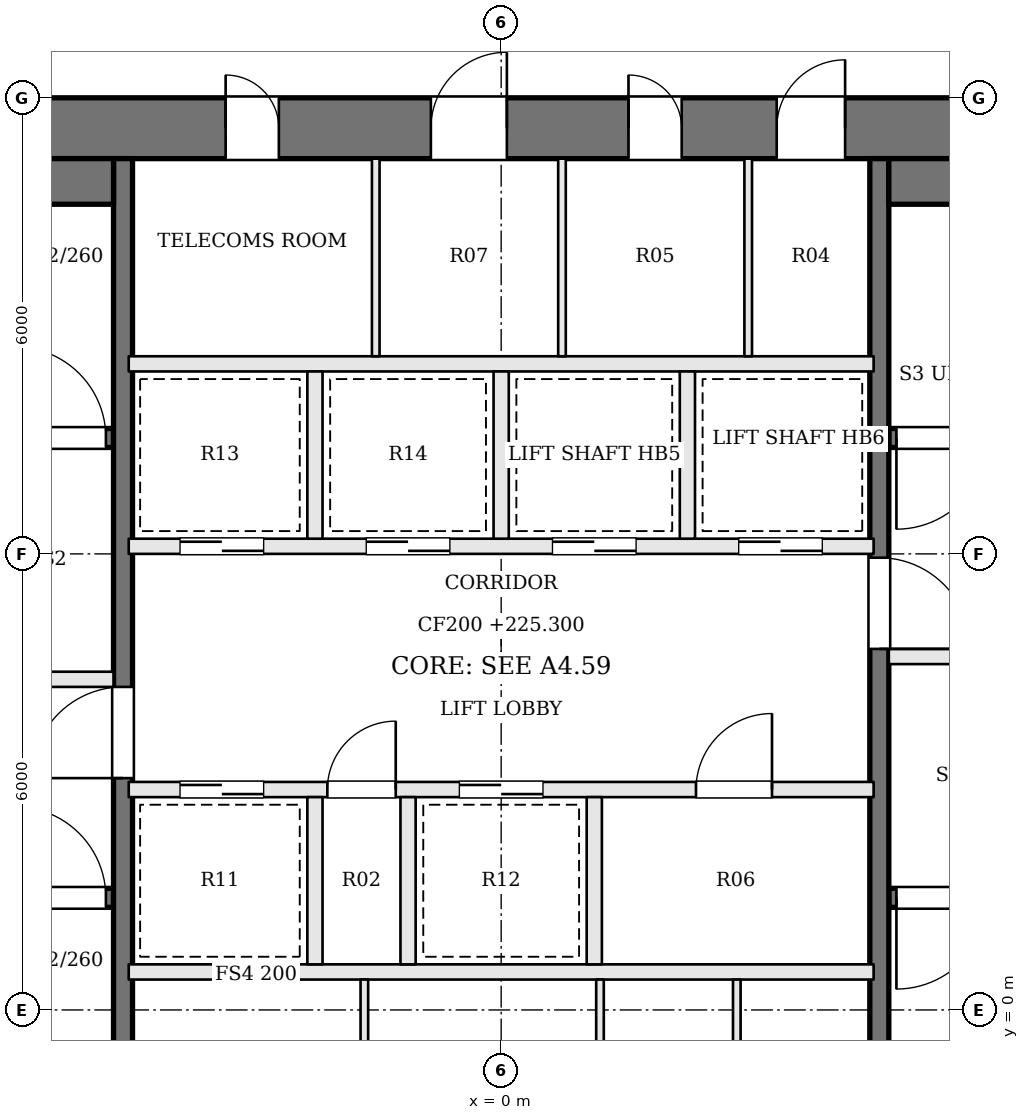
"""IFC4 building model, lengths in metres.
Left out: names, types, materials, properties, quantities, classifications, styles, units other than length and angle.
Written with IfcOpenShell. Run it as: python <this file> out.ifc"""

import sys

from ifc_helpers import new_model, si_unit, direction, frame, frame_2d, origin, place, context, subcontext, project, spatial, rectangle, extrude, element, fill, save


model = new_model("IFC4")
c1 = context("Model", 3, precision=1e-05, world=origin(), true_north=direction((0.0, 1.0)))
c2 = subcontext(c1, "Body", "Model", "MODEL_VIEW")
j1 = project(units=[si_unit("LENGTHUNIT", "METRE"), si_unit("PLANEANGLEUNIT", "RADIAN")], contexts=[c1])
p1 = place(None, origin())
s1 = spatial("IfcSite", under=j1, at=p1, CompositionType="ELEMENT")
p2 = place(p1, origin())
s2 = spatial("IfcBuilding", under=s1, at=p2, CompositionType="ELEMENT")
p3 = place(p2, frame((0.0, 0.0, 225.3)))
s3 = spatial("IfcBuildingStorey", under=s2, at=p3, CompositionType="ELEMENT", Elevation=225.3)
p4 = place(p3, frame((-13.0, 11.6, 0.0), z_axis=(0.0, 0.0, 1.0), x_axis=(1.0, 0.0, 0.0)))
e1 = element("IfcWall", 1, at=p4, inside=s3, PredefinedType="SHEAR", context=c2, shape_type="SweptSolid", body=[
    extrude(rectangle(XDim=26.0, YDim=0.8, at=frame_2d((13.0, 0.0))), origin(), (0.0, 0.0, 1.0), 3.9),
])
p5 = place(p4, frame((9.375, 0.0, 0.0)))
e2 = element("IfcOpeningElement", 2, at=p5, cuts=e1, PredefinedType="OPENING", context=c2, shape_type="SweptSolid", body=[
    extrude(rectangle(XDim=0.7, YDim=2.1, at=frame_2d((0.35, 1.05))), frame((0.0, 0.41, 0.0), z_axis=(0.0, -1.0, 0.0), x_axis=(1.0, 0.0, 0.0)), (0.0, 0.0, 1.0), 0.82),
])
p6 = place(p4, frame((12.075, 0.0, 0.0)))
e3 = element("IfcOpeningElement", 3, at=p6, cuts=e1, PredefinedType="OPENING", context=c2, shape_type="SweptSolid", body=[
    extrude(rectangle(XDim=1.0, YDim=2.1, at=frame_2d((0.5, 1.05))), frame((0.0, 0.41, 0.0), z_axis=(0.0, -1.0, 0.0), x_axis=(1.0, 0.0, 0.0)), (0.0, 0.0, 1.0), 0.82),
])
p7 = place(p4, frame((14.675, 0.0, 0.0)))
e4 = element("IfcOpeningElement", 4, at=p7, cuts=e1, PredefinedType="OPENING", context=c2, shape_type="SweptSolid", body=[
    extrude(rectangle(XDim=0.7, YDim=2.1, at=frame_2d((0.35, 1.05))), frame((0.0, 0.41, 0.0), z_axis=(0.0, -1.0, 0.0), x_axis=(1.0, 0.0, 0.0)), (0.0, 0.0, 1.0), 0.82),
])
p8 = place(p4, frame((16.625, 0.0, 0.0)))
e5 = element("IfcOpeningElement", 5, at=p8, cuts=e1, PredefinedType="OPENING", context=c2, shape_type="SweptSolid", body=[
    extrude(rectangle(XDim=0.9, YDim=2.1, at=frame_2d((0.45, 1.05))), frame((0.0, 0.41, 0.0), z_axis=(0.0, -1.0, 0.0), x_axis=(1.0, 0.0, 0.0)), (0.0, 0.0, 1.0), 0.82),
])
p9 = place(p3, frame((-12.2, 1.475, 0.0), z_axis=(0.0, 0.0, 1.0), x_axis=(1.0, 0.0, 0.0)))
e6 = element("IfcWall", 6, at=p9, inside=s3, PredefinedType="SOLIDWALL", context=c2, shape_type="SweptSolid", body=[
    extrude(rectangle(XDim=7.1, YDim=0.25, at=frame_2d((3.55, 0.0))), origin(), (0.0, 0.0, 1.0), 3.7),
])
p10 = place(p9, frame((5.8, 0.0, 0.0)))
e7 = element("IfcOpeningElement", 7, at=p10, cuts=e6, PredefinedType="OPENING", context=c2, shape_type="SweptSolid", body=[
    extrude(rectangle(XDim=1.2, YDim=2.1, at=frame_2d((0.6, 1.05))), frame((0.0, 0.135, 0.0), z_axis=(0.0, -1.0, 0.0), x_axis=(1.0, 0.0, 0.0)), (0.0, 0.0, 1.0), 0.27),
])
p11 = place(p3, frame((12.2, 7.525, 0.0), z_axis=(0.0, 0.0, 1.0), x_axis=(-1.0, 0.0, 0.0)))
e8 = element("IfcWall", 8, at=p11, inside=s3, PredefinedType="SOLIDWALL", context=c2, shape_type="SweptSolid", body=[
    extrude(rectangle(XDim=7.1, YDim=0.25, at=frame_2d((3.55, 0.0))), origin(), (0.0, 0.0, 1.0), 3.7),
])
p12 = place(p11, frame((5.8, 0.0, 0.0)))
e9 = element("IfcOpeningElement", 9, at=p12, cuts=e8, PredefinedType="OPENING", context=c2, shape_type="SweptSolid", body=[
    extrude(rectangle(XDim=1.2, YDim=2.1, at=frame_2d((0.6, 1.05))), frame((0.0, 0.135, 0.0), z_axis=(0.0, -1.0, 0.0), x_axis=(1.0, 0.0, 0.0)), (0.0, 0.0, 1.0), 0.27),
])
p13 = place(p3, frame((-12.2, 4.35, 0.0), z_axis=(0.0, 0.0, 1.0), x_axis=(1.0, 0.0, 0.0)))
e10 = element("IfcWall", 10, at=p13, inside=s3, PredefinedType="SOLIDWALL", context=c2, shape_type="SweptSolid", body=[
    extrude(rectangle(XDim=7.1, YDim=0.2, at=frame_2d((3.55, 0.0))), origin(), (0.0, 0.0, 1.0), 3.7),
])
p14 = place(p13, frame((4.4, 0.0, 0.0)))
e11 = element("IfcOpeningElement", 11, at=p14, cuts=e10, PredefinedType="OPENING", context=c2, shape_type="SweptSolid", body=[
    extrude(rectangle(XDim=1.2, YDim=2.1, at=frame_2d((0.6, 1.05))), frame((0.0, 0.11, 0.0), z_axis=(0.0, -1.0, 0.0), x_axis=(1.0, 0.0, 0.0)), (0.0, 0.0, 1.0), 0.22),
])
p15 = place(p13, frame((1.1, 0.0, 0.0)))
e12 = element("IfcOpeningElement", 12, at=p15, cuts=e10, PredefinedType="OPENING", context=c2, shape_type="SweptSolid", body=[
    extrude(rectangle(XDim=1.2, YDim=2.1, at=frame_2d((0.6, 1.05))), frame((0.0, 0.11, 0.0), z_axis=(0.0, -1.0, 0.0), x_axis=(1.0, 0.0, 0.0)), (0.0, 0.0, 1.0), 0.22),
])
p16 = place(p3, frame((12.2, 4.65, 0.0), z_axis=(0.0, 0.0, 1.0), x_axis=(-1.0, 0.0, 0.0)))
e13 = element("IfcWall", 13, at=p16, inside=s3, PredefinedType="SOLIDWALL", context=c2, shape_type="SweptSolid", body=[
    extrude(rectangle(XDim=7.1, YDim=0.2, at=frame_2d((3.55, 0.0))), origin(), (0.0, 0.0, 1.0), 3.7),
])
p17 = place(p16, frame((4.4, 0.0, 0.0)))
e14 = element("IfcOpeningElement", 14, at=p17, cuts=e13, PredefinedType="OPENING", context=c2, shape_type="SweptSolid", body=[
    extrude(rectangle(XDim=1.2, YDim=2.1, at=frame_2d((0.6, 1.05))), frame((0.0, 0.11, 0.0), z_axis=(0.0, -1.0, 0.0), x_axis=(1.0, 0.0, 0.0)), (0.0, 0.0, 1.0), 0.22),
])
p18 = place(p16, frame((1.1, 0.0, 0.0)))
e15 = element("IfcOpeningElement", 15, at=p18, cuts=e13, PredefinedType="OPENING", context=c2, shape_type="SweptSolid", body=[
    extrude(rectangle(XDim=1.2, YDim=2.1, at=frame_2d((0.6, 1.05))), frame((0.0, 0.11, 0.0), z_axis=(0.0, -1.0, 0.0), x_axis=(1.0, 0.0, 0.0)), (0.0, 0.0, 1.0), 0.22),
])
p19 = place(p3, frame((-12.2, 7.525, 0.0), z_axis=(0.0, 0.0, 1.0), x_axis=(1.0, 0.0, 0.0)))
e16 = element("IfcWall", 16, at=p19, inside=s3, PredefinedType="SOLIDWALL", context=c2, shape_type="SweptSolid", body=[
    extrude(rectangle(XDim=7.1, YDim=0.25, at=frame_2d((3.55, 0.0))), origin(), (0.0, 0.0, 1.0), 3.7),
])
p20 = place(p19, frame((5.8, 0.0, 0.0)))
e17 = element("IfcOpeningElement", 17, at=p20, cuts=e16, PredefinedType="OPENING", context=c2, shape_type="SweptSolid", body=[
    extrude(rectangle(XDim=1.2, YDim=2.1, at=frame_2d((0.6, 1.05))), frame((0.0, 0.135, 0.0), z_axis=(0.0, -1.0, 0.0), x_axis=(1.0, 0.0, 0.0)), (0.0, 0.0, 1.0), 0.27),
])
p21 = place(p3, frame((12.2, 1.475, 0.0), z_axis=(0.0, 0.0, 1.0), x_axis=(-1.0, 0.0, 0.0)))
e18 = element("IfcWall", 18, at=p21, inside=s3, PredefinedType="SOLIDWALL", context=c2, shape_type="SweptSolid", body=[
    extrude(rectangle(XDim=7.1, YDim=0.25, at=frame_2d((3.55, 0.0))), origin(), (0.0, 0.0, 1.0), 3.7),
])
p22 = place(p21, frame((5.8, 0.0, 0.0)))
e19 = element("IfcOpeningElement", 19, at=p22, cuts=e18, PredefinedType="OPENING", context=c2, shape_type="SweptSolid", body=[
    extrude(rectangle(XDim=1.2, YDim=2.1, at=frame_2d((0.6, 1.05))), frame((0.0, 0.135, 0.0), z_axis=(0.0, -1.0, 0.0), x_axis=(1.0, 0.0, 0.0)), (0.0, 0.0, 1.0), 0.27),
])
p23 = place(p3, frame((-4.975, -2.2, 0.0), z_axis=(0.0, 0.0, 1.0), x_axis=(0.0, 1.0, 0.0)))
e20 = element("IfcWall", 20, at=p23, inside=s3, PredefinedType="SOLIDWALL", context=c2, shape_type="SweptSolid", body=[
    extrude(rectangle(XDim=13.4, YDim=0.25, at=frame_2d((6.7, 0.0))), origin(), (0.0, 0.0, 1.0), 3.7),
])
p24 = place(p23, frame((5.25, 0.0, 0.0)))
e21 = element("IfcOpeningElement", 21, at=p24, cuts=e20, PredefinedType="OPENING", context=c2, shape_type="SweptSolid", body=[
    extrude(rectangle(XDim=1.2, YDim=2.1, at=frame_2d((0.6, 1.05))), frame((0.0, 0.135, 0.0), z_axis=(0.0, -1.0, 0.0), x_axis=(1.0, 0.0, 0.0)), (0.0, 0.0, 1.0), 0.27),
])
p25 = place(p3, frame((4.975, 11.2, 0.0), z_axis=(0.0, 0.0, 1.0), x_axis=(0.0, -1.0, 0.0)))
e22 = element("IfcWall", 22, at=p25, inside=s3, PredefinedType="SOLIDWALL", context=c2, shape_type="SweptSolid", body=[
    extrude(rectangle(XDim=13.4, YDim=0.25, at=frame_2d((6.7, 0.0))), origin(), (0.0, 0.0, 1.0), 3.7),
])
p26 = place(p25, frame((5.25, 0.0, 0.0)))
e23 = element("IfcOpeningElement", 23, at=p26, cuts=e22, PredefinedType="OPENING", context=c2, shape_type="SweptSolid", body=[
    extrude(rectangle(XDim=1.2, YDim=2.1, at=frame_2d((0.6, 1.05))), frame((0.0, 0.135, 0.0), z_axis=(0.0, -1.0, 0.0), x_axis=(1.0, 0.0, 0.0)), (0.0, 0.0, 1.0), 0.27),
])
for number, where, z_axis, x_axis in (
    (24, (-12.2, 10.9, 0.0), (0.0, 0.0, 1.0), (1.0, 0.0, 0.0)),
    (25, (12.2, 10.9, 0.0), (0.0, 0.0, 1.0), (-1.0, 0.0, 0.0)),
):
    element("IfcWall", number, at=place(p3, frame(where, z_axis=z_axis, x_axis=x_axis)), inside=s3, PredefinedType="SOLIDWALL", context=c2, shape_type="SweptSolid", body=[
        extrude(rectangle(XDim=7.1, YDim=0.6, at=frame_2d((3.55, 0.0))), origin(), (0.0, 0.0, 1.0), 3.7),
    ])
p27 = place(p3, frame((-4.9, 0.5, 0.0), z_axis=(0.0, 0.0, 1.0), x_axis=(1.0, 0.0, 0.0)))
e26 = element("IfcWall", 26, at=p27, inside=s3, PredefinedType="SOLIDWALL", context=c2, shape_type="SweptSolid", body=[
    extrude(rectangle(XDim=9.8, YDim=0.2, at=frame_2d((4.9, 0.0))), origin(), (0.0, 0.0, 1.0), 3.7),
])
p28 = place(p3, frame((-4.9, 2.9, 0.0), z_axis=(0.0, 0.0, 1.0), x_axis=(1.0, 0.0, 0.0)))
e27 = element("IfcWall", 27, at=p28, inside=s3, PredefinedType="SOLIDWALL", context=c2, shape_type="SweptSolid", body=[
    extrude(rectangle(XDim=9.8, YDim=0.2, at=frame_2d((4.9, 0.0))), origin(), (0.0, 0.0, 1.0), 3.7),
])
p29 = place(p28, frame((0.675, 0.0, 0.0)))
e28 = element("IfcOpeningElement", 28, at=p29, cuts=e27, PredefinedType="OPENING", context=c2, shape_type="SweptSolid", body=[
    extrude(rectangle(XDim=1.1, YDim=2.1, at=frame_2d((0.55, 1.05))), frame((0.0, 0.11, 0.0), z_axis=(0.0, -1.0, 0.0), x_axis=(1.0, 0.0, 0.0)), (0.0, 0.0, 1.0), 0.22),
])
p30 = place(p28, frame((2.613, 0.0, 0.0)))
e29 = element("IfcOpeningElement", 29, at=p30, cuts=e27, PredefinedType="OPENING", context=c2, shape_type="SweptSolid", body=[
    extrude(rectangle(XDim=0.9, YDim=2.1, at=frame_2d((0.45, 1.05))), frame((0.0, 0.11, 0.0), z_axis=(0.0, -1.0, 0.0), x_axis=(1.0, 0.0, 0.0)), (0.0, 0.0, 1.0), 0.22),
])
p31 = place(p28, frame((4.35, 0.0, 0.0)))
e30 = element("IfcOpeningElement", 30, at=p31, cuts=e27, PredefinedType="OPENING", context=c2, shape_type="SweptSolid", body=[
    extrude(rectangle(XDim=1.1, YDim=2.1, at=frame_2d((0.55, 1.05))), frame((0.0, 0.11, 0.0), z_axis=(0.0, -1.0, 0.0), x_axis=(1.0, 0.0, 0.0)), (0.0, 0.0, 1.0), 0.22),
])
p32 = place(p28, frame((7.463, 0.0, 0.0)))
e31 = element("IfcOpeningElement", 31, at=p32, cuts=e27, PredefinedType="OPENING", context=c2, shape_type="SweptSolid", body=[
    extrude(rectangle(XDim=1.0, YDim=2.1, at=frame_2d((0.5, 1.05))), frame((0.0, 0.11, 0.0), z_axis=(0.0, -1.0, 0.0), x_axis=(1.0, 0.0, 0.0)), (0.0, 0.0, 1.0), 0.22),
])
p33 = place(p3, frame((-4.9, 6.1, 0.0), z_axis=(0.0, 0.0, 1.0), x_axis=(1.0, 0.0, 0.0)))
e32 = element("IfcWall", 32, at=p33, inside=s3, PredefinedType="SOLIDWALL", context=c2, shape_type="SweptSolid", body=[
    extrude(rectangle(XDim=9.8, YDim=0.2, at=frame_2d((4.9, 0.0))), origin(), (0.0, 0.0, 1.0), 3.7),
])
p34 = place(p33, frame((0.675, 0.0, 0.0)))
e33 = element("IfcOpeningElement", 33, at=p34, cuts=e32, PredefinedType="OPENING", context=c2, shape_type="SweptSolid", body=[
    extrude(rectangle(XDim=1.1, YDim=2.1, at=frame_2d((0.55, 1.05))), frame((0.0, 0.11, 0.0), z_axis=(0.0, -1.0, 0.0), x_axis=(1.0, 0.0, 0.0)), (0.0, 0.0, 1.0), 0.22),
])
p35 = place(p33, frame((3.125, 0.0, 0.0)))
e34 = element("IfcOpeningElement", 34, at=p35, cuts=e32, PredefinedType="OPENING", context=c2, shape_type="SweptSolid", body=[
    extrude(rectangle(XDim=1.1, YDim=2.1, at=frame_2d((0.55, 1.05))), frame((0.0, 0.11, 0.0), z_axis=(0.0, -1.0, 0.0), x_axis=(1.0, 0.0, 0.0)), (0.0, 0.0, 1.0), 0.22),
])
p36 = place(p33, frame((5.575, 0.0, 0.0)))
e35 = element("IfcOpeningElement", 35, at=p36, cuts=e32, PredefinedType="OPENING", context=c2, shape_type="SweptSolid", body=[
    extrude(rectangle(XDim=1.1, YDim=2.1, at=frame_2d((0.55, 1.05))), frame((0.0, 0.11, 0.0), z_axis=(0.0, -1.0, 0.0), x_axis=(1.0, 0.0, 0.0)), (0.0, 0.0, 1.0), 0.22),
])
p37 = place(p33, frame((8.025, 0.0, 0.0)))
e36 = element("IfcOpeningElement", 36, at=p37, cuts=e32, PredefinedType="OPENING", context=c2, shape_type="SweptSolid", body=[
    extrude(rectangle(XDim=1.1, YDim=2.1, at=frame_2d((0.55, 1.05))), frame((0.0, 0.11, 0.0), z_axis=(0.0, -1.0, 0.0), x_axis=(1.0, 0.0, 0.0)), (0.0, 0.0, 1.0), 0.22),
])
p38 = place(p3, frame((-4.9, 8.5, 0.0), z_axis=(0.0, 0.0, 1.0), x_axis=(1.0, 0.0, 0.0)))
e37 = element("IfcWall", 37, at=p38, inside=s3, PredefinedType="SOLIDWALL", context=c2, shape_type="SweptSolid", body=[
    extrude(rectangle(XDim=9.8, YDim=0.2, at=frame_2d((4.9, 0.0))), origin(), (0.0, 0.0, 1.0), 3.7),
])
for number, where, z_axis, x_axis in (
    (38, (-2.45, 0.6, 0.0), (0.0, 0.0, 1.0), (0.0, 1.0, 0.0)),
    (39, (-1.225, 0.6, 0.0), (0.0, 0.0, 1.0), (0.0, 1.0, 0.0)),
    (40, (1.225, 0.6, 0.0), (0.0, 0.0, 1.0), (0.0, 1.0, 0.0)),
    (41, (-2.45, 6.2, 0.0), (0.0, 0.0, 1.0), (0.0, 1.0, 0.0)),
    (42, (0.0, 6.2, 0.0), (0.0, 0.0, 1.0), (0.0, 1.0, 0.0)),
    (43, (2.45, 6.2, 0.0), (0.0, 0.0, 1.0), (0.0, 1.0, 0.0)),
):
    element("IfcWall", number, at=place(p3, frame(where, z_axis=z_axis, x_axis=x_axis)), inside=s3, PredefinedType="SOLIDWALL", context=c2, shape_type="SweptSolid", body=[
        extrude(rectangle(XDim=2.2, YDim=0.2, at=frame_2d((1.1, 0.0))), origin(), (0.0, 0.0, 1.0), 3.7),
    ])
for number, where, z_axis, x_axis in (
    (44, (-1.8, -2.2, 0.0), (0.0, 0.0, 1.0), (0.0, 1.0, 0.0)),
    (45, (1.3, -2.2, 0.0), (0.0, 0.0, 1.0), (0.0, 1.0, 0.0)),
    (46, (3.1, -2.2, 0.0), (0.0, 0.0, 1.0), (0.0, 1.0, 0.0)),
    (47, (-1.65, 8.6, 0.0), (0.0, 0.0, 1.0), (0.0, 1.0, 0.0)),
    (48, (0.8, 8.6, 0.0), (0.0, 0.0, 1.0), (0.0, 1.0, 0.0)),
    (49, (3.25, 8.6, 0.0), (0.0, 0.0, 1.0), (0.0, 1.0, 0.0)),
):
    element("IfcWall", number, at=place(p3, frame(where, z_axis=z_axis, x_axis=x_axis)), inside=s3, PredefinedType="PARTITIONING", context=c2, shape_type="SweptSolid", body=[
        extrude(rectangle(XDim=2.6, YDim=0.1, at=frame_2d((1.3, 0.0))), origin(), (0.0, 0.0, 1.0), 3.7),
    ])
p39 = place(p24, origin())
e50 = element("IfcDoor", 50, at=p39, inside=s3, OperationType="SINGLE_SWING_LEFT", PredefinedType="DOOR", context=c2, shape_type="SweptSolid", body=[
    extrude(rectangle(XDim=1.2, YDim=2.1, at=frame_2d((0.6, 1.05))), frame((0.0, 0.025, 0.0), z_axis=(0.0, -1.0, 0.0), x_axis=(1.0, 0.0, 0.0)), (0.0, 0.0, 1.0), 0.05),
])
fill(e21, e50)
p40 = place(p26, origin())
e51 = element("IfcDoor", 51, at=p40, inside=s3, OperationType="SINGLE_SWING_RIGHT", PredefinedType="DOOR", context=c2, shape_type="SweptSolid", body=[
    extrude(rectangle(XDim=1.2, YDim=2.1, at=frame_2d((0.6, 1.05))), frame((0.0, 0.025, 0.0), z_axis=(0.0, -1.0, 0.0), x_axis=(1.0, 0.0, 0.0)), (0.0, 0.0, 1.0), 0.05),
])
fill(e23, e51)
p41 = place(p10, origin())
e52 = element("IfcDoor", 52, at=p41, inside=s3, OperationType="SINGLE_SWING_LEFT", PredefinedType="DOOR", context=c2, shape_type="SweptSolid", body=[
    extrude(rectangle(XDim=1.2, YDim=2.1, at=frame_2d((0.6, 1.05))), frame((0.0, 0.025, 0.0), z_axis=(0.0, -1.0, 0.0), x_axis=(1.0, 0.0, 0.0)), (0.0, 0.0, 1.0), 0.05),
])
fill(e7, e52)
p42 = place(p12, origin())
e53 = element("IfcDoor", 53, at=p42, inside=s3, OperationType="SINGLE_SWING_RIGHT", PredefinedType="DOOR", context=c2, shape_type="SweptSolid", body=[
    extrude(rectangle(XDim=1.2, YDim=2.1, at=frame_2d((0.6, 1.05))), frame((0.0, 0.025, 0.0), z_axis=(0.0, -1.0, 0.0), x_axis=(1.0, 0.0, 0.0)), (0.0, 0.0, 1.0), 0.05),
])
fill(e9, e53)
p43 = place(p20, origin())
e54 = element("IfcDoor", 54, at=p43, inside=s3, OperationType="SINGLE_SWING_LEFT", PredefinedType="DOOR", context=c2, shape_type="SweptSolid", body=[
    extrude(rectangle(XDim=1.2, YDim=2.1, at=frame_2d((0.6, 1.05))), frame((0.0, 0.025, 0.0), z_axis=(0.0, -1.0, 0.0), x_axis=(1.0, 0.0, 0.0)), (0.0, 0.0, 1.0), 0.05),
])
fill(e17, e54)
p44 = place(p22, origin())
e55 = element("IfcDoor", 55, at=p44, inside=s3, OperationType="SINGLE_SWING_RIGHT", PredefinedType="DOOR", context=c2, shape_type="SweptSolid", body=[
    extrude(rectangle(XDim=1.2, YDim=2.1, at=frame_2d((0.6, 1.05))), frame((0.0, 0.025, 0.0), z_axis=(0.0, -1.0, 0.0), x_axis=(1.0, 0.0, 0.0)), (0.0, 0.0, 1.0), 0.05),
])
fill(e19, e55)
p45 = place(p29, origin())
e56 = element("IfcDoor", 56, at=p45, inside=s3, OperationType="SLIDING_TO_RIGHT", PredefinedType="DOOR", context=c2, shape_type="SweptSolid", body=[
    extrude(rectangle(XDim=1.1, YDim=2.1, at=frame_2d((0.55, 1.05))), frame((0.0, 0.025, 0.0), z_axis=(0.0, -1.0, 0.0), x_axis=(1.0, 0.0, 0.0)), (0.0, 0.0, 1.0), 0.05),
])
fill(e28, e56)
p46 = place(p30, origin())
e57 = element("IfcDoor", 57, at=p46, inside=s3, OperationType="SINGLE_SWING_RIGHT", PredefinedType="DOOR", context=c2, shape_type="SweptSolid", body=[
    extrude(rectangle(XDim=0.9, YDim=2.1, at=frame_2d((0.45, 1.05))), frame((0.0, 0.025, 0.0), z_axis=(0.0, -1.0, 0.0), x_axis=(1.0, 0.0, 0.0)), (0.0, 0.0, 1.0), 0.05),
])
fill(e29, e57)
p47 = place(p31, origin())
e58 = element("IfcDoor", 58, at=p47, inside=s3, OperationType="SLIDING_TO_LEFT", PredefinedType="DOOR", context=c2, shape_type="SweptSolid", body=[
    extrude(rectangle(XDim=1.1, YDim=2.1, at=frame_2d((0.55, 1.05))), frame((0.0, 0.025, 0.0), z_axis=(0.0, -1.0, 0.0), x_axis=(1.0, 0.0, 0.0)), (0.0, 0.0, 1.0), 0.05),
])
fill(e30, e58)
p48 = place(p32, origin())
e59 = element("IfcDoor", 59, at=p48, inside=s3, OperationType="SINGLE_SWING_RIGHT", PredefinedType="DOOR", context=c2, shape_type="SweptSolid", body=[
    extrude(rectangle(XDim=1.0, YDim=2.1, at=frame_2d((0.5, 1.05))), frame((0.0, 0.025, 0.0), z_axis=(0.0, -1.0, 0.0), x_axis=(1.0, 0.0, 0.0)), (0.0, 0.0, 1.0), 0.05),
])
fill(e31, e59)
p49 = place(p34, origin())
e60 = element("IfcDoor", 60, at=p49, inside=s3, OperationType="SLIDING_TO_RIGHT", PredefinedType="DOOR", context=c2, shape_type="SweptSolid", body=[
    extrude(rectangle(XDim=1.1, YDim=2.1, at=frame_2d((0.55, 1.05))), frame((0.0, 0.025, 0.0), z_axis=(0.0, -1.0, 0.0), x_axis=(1.0, 0.0, 0.0)), (0.0, 0.0, 1.0), 0.05),
])
fill(e33, e60)
p50 = place(p35, origin())
e61 = element("IfcDoor", 61, at=p50, inside=s3, OperationType="SLIDING_TO_LEFT", PredefinedType="DOOR", context=c2, shape_type="SweptSolid", body=[
    extrude(rectangle(XDim=1.1, YDim=2.1, at=frame_2d((0.55, 1.05))), frame((0.0, 0.025, 0.0), z_axis=(0.0, -1.0, 0.0), x_axis=(1.0, 0.0, 0.0)), (0.0, 0.0, 1.0), 0.05),
])
fill(e34, e61)
p51 = place(p36, origin())
e62 = element("IfcDoor", 62, at=p51, inside=s3, OperationType="SLIDING_TO_RIGHT", PredefinedType="DOOR", context=c2, shape_type="SweptSolid", body=[
    extrude(rectangle(XDim=1.1, YDim=2.1, at=frame_2d((0.55, 1.05))), frame((0.0, 0.025, 0.0), z_axis=(0.0, -1.0, 0.0), x_axis=(1.0, 0.0, 0.0)), (0.0, 0.0, 1.0), 0.05),
])
fill(e35, e62)
p52 = place(p37, origin())
e63 = element("IfcDoor", 63, at=p52, inside=s3, OperationType="SLIDING_TO_LEFT", PredefinedType="DOOR", context=c2, shape_type="SweptSolid", body=[
    extrude(rectangle(XDim=1.1, YDim=2.1, at=frame_2d((0.55, 1.05))), frame((0.0, 0.025, 0.0), z_axis=(0.0, -1.0, 0.0), x_axis=(1.0, 0.0, 0.0)), (0.0, 0.0, 1.0), 0.05),
])
fill(e36, e63)
p53 = place(p5, origin())
e64 = element("IfcDoor", 64, at=p53, inside=s3, OperationType="SINGLE_SWING_LEFT", PredefinedType="DOOR", context=c2, shape_type="SweptSolid", body=[
    extrude(rectangle(XDim=0.7, YDim=2.1, at=frame_2d((0.35, 1.05))), frame((0.0, 0.025, 0.0), z_axis=(0.0, -1.0, 0.0), x_axis=(1.0, 0.0, 0.0)), (0.0, 0.0, 1.0), 0.05),
])
fill(e2, e64)
p54 = place(p6, origin())
e65 = element("IfcDoor", 65, at=p54, inside=s3, OperationType="SINGLE_SWING_RIGHT", PredefinedType="DOOR", context=c2, shape_type="SweptSolid", body=[
    extrude(rectangle(XDim=1.0, YDim=2.1, at=frame_2d((0.5, 1.05))), frame((0.0, 0.025, 0.0), z_axis=(0.0, -1.0, 0.0), x_axis=(1.0, 0.0, 0.0)), (0.0, 0.0, 1.0), 0.05),
])
fill(e3, e65)
p55 = place(p7, origin())
e66 = element("IfcDoor", 66, at=p55, inside=s3, OperationType="SINGLE_SWING_LEFT", PredefinedType="DOOR", context=c2, shape_type="SweptSolid", body=[
    extrude(rectangle(XDim=0.7, YDim=2.1, at=frame_2d((0.35, 1.05))), frame((0.0, 0.025, 0.0), z_axis=(0.0, -1.0, 0.0), x_axis=(1.0, 0.0, 0.0)), (0.0, 0.0, 1.0), 0.05),
])
fill(e4, e66)
p56 = place(p8, origin())
e67 = element("IfcDoor", 67, at=p56, inside=s3, OperationType="SINGLE_SWING_RIGHT", PredefinedType="DOOR", context=c2, shape_type="SweptSolid", body=[
    extrude(rectangle(XDim=0.9, YDim=2.1, at=frame_2d((0.45, 1.05))), frame((0.0, 0.025, 0.0), z_axis=(0.0, -1.0, 0.0), x_axis=(1.0, 0.0, 0.0)), (0.0, 0.0, 1.0), 0.05),
])
fill(e5, e67)
save(model, sys.argv[1])
